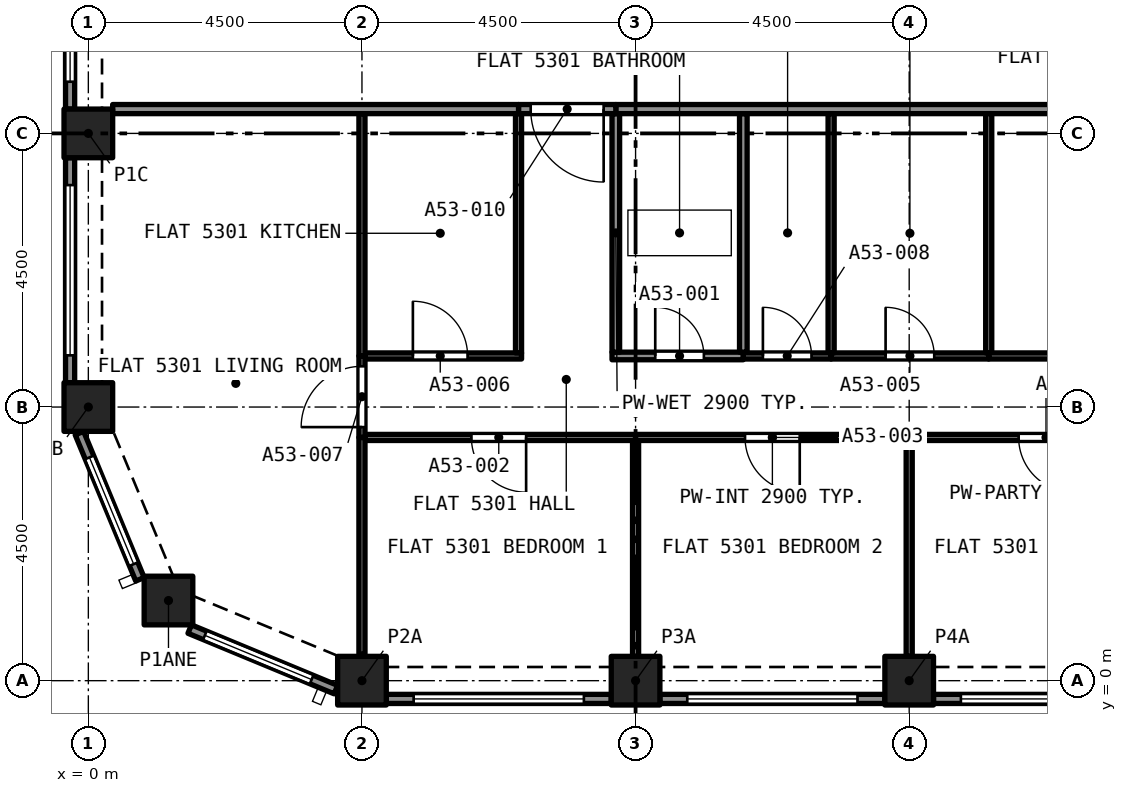
"""IFC4 building model, lengths in metres.
Left out: names, types, materials, properties, quantities, classifications, styles, units other than length and angle.
Written with IfcOpenShell. Run it as: python <this file> out.ifc"""

import sys

from ifc_helpers import new_model, si_unit, direction, frame, frame_2d, origin, origin_2d, place, context, subcontext, project, spatial, rectangle, extrude, element, fill, save


model = new_model("IFC4")
c1 = context("Model", 3, precision=1e-05, world=origin(), true_north=direction((0.0, 1.0)))
c2 = subcontext(c1, "Body", "Model", "MODEL_VIEW")
j1 = project(units=[si_unit("LENGTHUNIT", "METRE"), si_unit("PLANEANGLEUNIT", "RADIAN")], contexts=[c1])
p1 = place(None, origin())
s1 = spatial("IfcSite", under=j1, at=p1, CompositionType="ELEMENT")
p2 = place(p1, origin())
s2 = spatial("IfcBuilding", under=s1, at=p2, CompositionType="ELEMENT")
p3 = place(p2, frame((0.0, 0.0, 192.3)))
s3 = spatial("IfcBuildingStorey", under=s2, at=p3, CompositionType="ELEMENT", Elevation=192.3)
for number, where, z_axis, x_axis in (
    (1, (4.5, 0.0, 0.0), (0.0, 0.0, 1.0), (1.0, 0.0, 0.0)),
    (2, (9.0, 0.0, 0.0), (0.0, 0.0, 1.0), (1.0, 0.0, 0.0)),
    (3, (13.5, 0.0, 0.0), (0.0, 0.0, 1.0), (1.0, 0.0, 0.0)),
    (4, (1.318, 1.318, 0.0), (0.0, 0.0, 1.0), (1.0, 0.0, 0.0)),
    (5, (0.0, 4.5, 0.0), (0.0, 0.0, 1.0), (1.0, 0.0, 0.0)),
    (6, (0.0, 9.0, 0.0), (0.0, 0.0, 1.0), (1.0, 0.0, 0.0)),
):
    element("IfcColumn", number, at=place(p3, frame(where, z_axis=z_axis, x_axis=x_axis)), inside=s3, PredefinedType="COLUMN", context=c2, shape_type="SweptSolid", body=[
        extrude(rectangle(XDim=0.8, YDim=0.8, at=origin_2d()), origin(), (0.0, 0.0, 1.0), 3.2),
    ])
p4 = place(p3, frame((-0.3, 9.4, 0.0), z_axis=(0.0, 0.0, 1.0), x_axis=(0.0, 1.0, 0.0)))
e7 = element("IfcWall", 7, at=p4, inside=s3, PredefinedType="SOLIDWALL", context=c2, shape_type="SweptSolid", body=[
    extrude(rectangle(XDim=3.7, YDim=0.15, at=frame_2d((1.85, 0.0))), origin(), (0.0, 0.0, 1.0), 3.2),
])
p5 = place(p4, frame((0.45, 0.0, 0.45)))
e8 = element("IfcOpeningElement", 8, at=p5, cuts=e7, PredefinedType="OPENING", context=c2, shape_type="SweptSolid", body=[
    extrude(rectangle(XDim=2.8, YDim=1.95, at=frame_2d((1.4, 0.975))), frame((0.0, 0.085, 0.0), z_axis=(0.0, -1.0, 0.0), x_axis=(1.0, 0.0, 0.0)), (0.0, 0.0, 1.0), 0.17),
])
p6 = place(p3, frame((-0.3, 4.9, 0.0), z_axis=(0.0, 0.0, 1.0), x_axis=(0.0, 1.0, 0.0)))
e9 = element("IfcWall", 9, at=p6, inside=s3, PredefinedType="SOLIDWALL", context=c2, shape_type="SweptSolid", body=[
    extrude(rectangle(XDim=3.7, YDim=0.15, at=frame_2d((1.85, 0.0))), origin(), (0.0, 0.0, 1.0), 3.2),
])
p7 = place(p6, frame((0.45, 0.0, 0.45)))
e10 = element("IfcOpeningElement", 10, at=p7, cuts=e9, PredefinedType="OPENING", context=c2, shape_type="SweptSolid", body=[
    extrude(rectangle(XDim=2.8, YDim=1.95, at=frame_2d((1.4, 0.975))), frame((0.0, 0.085, 0.0), z_axis=(0.0, -1.0, 0.0), x_axis=(1.0, 0.0, 0.0)), (0.0, 0.0, 1.0), 0.17),
])
p8 = place(p3, frame((0.849, 1.667, 0.0), z_axis=(0.0, 0.0, 1.0), x_axis=(-0.382669406082, 0.923885342263, 0.0)))
e11 = element("IfcWall", 11, at=p8, inside=s3, PredefinedType="SOLIDWALL", context=c2, shape_type="SweptSolid", body=[
    extrude(rectangle(XDim=2.602, YDim=0.15, at=frame_2d((1.301, 0.0))), origin(), (0.0, 0.0, 1.0), 3.2),
])
p9 = place(p8, frame((0.27, 0.0, 0.45)))
e12 = element("IfcOpeningElement", 12, at=p9, cuts=e11, PredefinedType="OPENING", context=c2, shape_type="SweptSolid", body=[
    extrude(rectangle(XDim=1.9, YDim=1.95, at=frame_2d((0.95, 0.975))), frame((0.0, 0.085, 0.0), z_axis=(0.0, -1.0, 0.0), x_axis=(1.0, 0.0, 0.0)), (0.0, 0.0, 1.0), 0.17),
])
p10 = place(p3, frame((4.071, -0.147, 0.0), z_axis=(0.0, 0.0, 1.0), x_axis=(-0.923885342263, 0.382669406082, 0.0)))
e13 = element("IfcWall", 13, at=p10, inside=s3, PredefinedType="SOLIDWALL", context=c2, shape_type="SweptSolid", body=[
    extrude(rectangle(XDim=2.602, YDim=0.15, at=frame_2d((1.301, 0.0))), origin(), (0.0, 0.0, 1.0), 3.2),
])
p11 = place(p10, frame((0.432, 0.0, 0.45)))
e14 = element("IfcOpeningElement", 14, at=p11, cuts=e13, PredefinedType="OPENING", context=c2, shape_type="SweptSolid", body=[
    extrude(rectangle(XDim=1.9, YDim=1.95, at=frame_2d((0.95, 0.975))), frame((0.0, 0.085, 0.0), z_axis=(0.0, -1.0, 0.0), x_axis=(1.0, 0.0, 0.0)), (0.0, 0.0, 1.0), 0.17),
])
p12 = place(p3, frame((8.6, -0.3, 0.0), z_axis=(0.0, 0.0, 1.0), x_axis=(-1.0, 0.0, 0.0)))
e15 = element("IfcWall", 15, at=p12, inside=s3, PredefinedType="SOLIDWALL", context=c2, shape_type="SweptSolid", body=[
    extrude(rectangle(XDim=3.7, YDim=0.15, at=frame_2d((1.85, 0.0))), origin(), (0.0, 0.0, 1.0), 3.2),
])
p13 = place(p12, frame((0.45, 0.0, 0.45)))
e16 = element("IfcOpeningElement", 16, at=p13, cuts=e15, PredefinedType="OPENING", context=c2, shape_type="SweptSolid", body=[
    extrude(rectangle(XDim=2.8, YDim=1.95, at=frame_2d((1.4, 0.975))), frame((0.0, 0.085, 0.0), z_axis=(0.0, -1.0, 0.0), x_axis=(1.0, 0.0, 0.0)), (0.0, 0.0, 1.0), 0.17),
])
p14 = place(p3, frame((13.1, -0.3, 0.0), z_axis=(0.0, 0.0, 1.0), x_axis=(-1.0, 0.0, 0.0)))
e17 = element("IfcWall", 17, at=p14, inside=s3, PredefinedType="SOLIDWALL", context=c2, shape_type="SweptSolid", body=[
    extrude(rectangle(XDim=3.7, YDim=0.15, at=frame_2d((1.85, 0.0))), origin(), (0.0, 0.0, 1.0), 3.2),
])
p15 = place(p14, frame((0.45, 0.0, 0.45)))
e18 = element("IfcOpeningElement", 18, at=p15, cuts=e17, PredefinedType="OPENING", context=c2, shape_type="SweptSolid", body=[
    extrude(rectangle(XDim=2.8, YDim=1.95, at=frame_2d((1.4, 0.975))), frame((0.0, 0.085, 0.0), z_axis=(0.0, -1.0, 0.0), x_axis=(1.0, 0.0, 0.0)), (0.0, 0.0, 1.0), 0.17),
])
p16 = place(p3, frame((17.6, -0.3, 0.0), z_axis=(0.0, 0.0, 1.0), x_axis=(-1.0, 0.0, 0.0)))
e19 = element("IfcWall", 19, at=p16, inside=s3, PredefinedType="SOLIDWALL", context=c2, shape_type="SweptSolid", body=[
    extrude(rectangle(XDim=3.7, YDim=0.15, at=frame_2d((1.85, 0.0))), origin(), (0.0, 0.0, 1.0), 3.2),
])
p17 = place(p16, frame((0.45, 0.0, 0.45)))
e20 = element("IfcOpeningElement", 20, at=p17, cuts=e19, PredefinedType="OPENING", context=c2, shape_type="SweptSolid", body=[
    extrude(rectangle(XDim=2.8, YDim=1.95, at=frame_2d((1.4, 0.975))), frame((0.0, 0.085, 0.0), z_axis=(0.0, -1.0, 0.0), x_axis=(1.0, 0.0, 0.0)), (0.0, 0.0, 1.0), 0.17),
])
p18 = place(p3, frame((8.613, 5.34, 0.0), z_axis=(0.0, 0.0, 1.0), x_axis=(1.0, 0.0, 0.0)))
e21 = element("IfcWall", 21, at=p18, inside=s3, PredefinedType="PARTITIONING", context=c2, shape_type="SweptSolid", body=[
    extrude(rectangle(XDim=2.159, YDim=0.125, at=frame_2d((1.08, 0.0))), origin(), (0.0, 0.0, 1.0), 2.9),
])
p19 = place(p18, frame((0.711, 0.0, 0.0)))
e22 = element("IfcOpeningElement", 22, at=p19, cuts=e21, PredefinedType="OPENING", context=c2, shape_type="SweptSolid", body=[
    extrude(rectangle(XDim=0.8, YDim=2.1, at=frame_2d((0.4, 1.05))), frame((0.0, 0.073, 0.0), z_axis=(0.0, -1.0, 0.0), x_axis=(1.0, 0.0, 0.0)), (0.0, 0.0, 1.0), 0.145),
])
for number, where, z_axis, x_axis in (
    (23, (8.675, 5.403, 0.0), (0.0, 0.0, 1.0), (0.0, 1.0, 0.0)),
    (24, (10.772, 5.403, 0.0), (0.0, 0.0, 1.0), (0.0, 1.0, 0.0)),
):
    element("IfcWall", number, at=place(p3, frame(where, z_axis=z_axis, x_axis=x_axis)), inside=s3, PredefinedType="PARTITIONING", context=c2, shape_type="SweptSolid", body=[
        extrude(rectangle(XDim=3.922, YDim=0.125, at=frame_2d((1.961, 0.0))), origin(), (0.0, 0.0, 1.0), 2.9),
    ])
p20 = place(p3, frame((8.675, 9.4, 0.0), z_axis=(0.0, 0.0, 1.0), x_axis=(1.0, 0.0, 0.0)))
e25 = element("IfcWall", 25, at=p20, inside=s3, PredefinedType="PARTITIONING", context=c2, shape_type="SweptSolid", body=[
    extrude(rectangle(XDim=8.925, YDim=0.15, at=frame_2d((4.462, 0.0))), origin(), (0.0, 0.0, 1.0), 2.9),
])
p21 = place(p3, frame((9.0, 0.4, 0.0), z_axis=(0.0, 0.0, 1.0), x_axis=(0.0, 1.0, 0.0)))
e26 = element("IfcWall", 26, at=p21, inside=s3, PredefinedType="PARTITIONING", context=c2, shape_type="SweptSolid", body=[
    extrude(rectangle(XDim=3.55, YDim=0.1, at=frame_2d((1.775, 0.0))), origin(), (0.0, 0.0, 1.0), 2.9),
])
p22 = place(p3, frame((9.0, 4.0, 0.0), z_axis=(0.0, 0.0, 1.0), x_axis=(-1.0, 0.0, 0.0)))
e27 = element("IfcWall", 27, at=p22, inside=s3, PredefinedType="PARTITIONING", context=c2, shape_type="SweptSolid", body=[
    extrude(rectangle(XDim=4.45, YDim=0.1, at=frame_2d((2.225, 0.0))), origin(), (0.0, 0.0, 1.0), 2.9),
])
p23 = place(p22, frame((1.8, 0.0, 0.0)))
e28 = element("IfcOpeningElement", 28, at=p23, cuts=e27, PredefinedType="OPENING", context=c2, shape_type="SweptSolid", body=[
    extrude(rectangle(XDim=0.9, YDim=2.1, at=frame_2d((0.45, 1.05))), frame((0.0, 0.06, 0.0), z_axis=(0.0, -1.0, 0.0), x_axis=(1.0, 0.0, 0.0)), (0.0, 0.0, 1.0), 0.12),
])
p24 = place(p3, frame((4.5, 0.433, 0.0), z_axis=(0.0, 0.0, 1.0), x_axis=(0.0, 1.0, 0.0)))
e29 = element("IfcWall", 29, at=p24, inside=s3, PredefinedType="PARTITIONING", context=c2, shape_type="SweptSolid", body=[
    extrude(rectangle(XDim=3.567, YDim=0.1, at=frame_2d((1.784, 0.0))), origin(), (0.0, 0.0, 1.0), 2.9),
])
p25 = place(p3, frame((13.5, 0.4, 0.0), z_axis=(0.0, 0.0, 1.0), x_axis=(0.0, 1.0, 0.0)))
e30 = element("IfcWall", 30, at=p25, inside=s3, PredefinedType="PARTITIONING", context=c2, shape_type="SweptSolid", body=[
    extrude(rectangle(XDim=3.55, YDim=0.1, at=frame_2d((1.775, 0.0))), origin(), (0.0, 0.0, 1.0), 2.9),
])
p26 = place(p3, frame((13.5, 4.0, 0.0), z_axis=(0.0, 0.0, 1.0), x_axis=(-1.0, 0.0, 0.0)))
e31 = element("IfcWall", 31, at=p26, inside=s3, PredefinedType="PARTITIONING", context=c2, shape_type="SweptSolid", body=[
    extrude(rectangle(XDim=4.5, YDim=0.1, at=frame_2d((2.25, 0.0))), origin(), (0.0, 0.0, 1.0), 2.9),
])
p27 = place(p26, frame((1.8, 0.0, 0.0)))
e32 = element("IfcOpeningElement", 32, at=p27, cuts=e31, PredefinedType="OPENING", context=c2, shape_type="SweptSolid", body=[
    extrude(rectangle(XDim=0.9, YDim=2.1, at=frame_2d((0.45, 1.05))), frame((0.0, 0.06, 0.0), z_axis=(0.0, -1.0, 0.0), x_axis=(1.0, 0.0, 0.0)), (0.0, 0.0, 1.0), 0.12),
])
p28 = place(p3, frame((17.9, 4.0, 0.0), z_axis=(0.0, 0.0, 1.0), x_axis=(-1.0, 0.0, 0.0)))
e33 = element("IfcWall", 33, at=p28, inside=s3, PredefinedType="PARTITIONING", context=c2, shape_type="SweptSolid", body=[
    extrude(rectangle(XDim=4.4, YDim=0.1, at=frame_2d((2.2, 0.0))), origin(), (0.0, 0.0, 1.0), 2.9),
])
p29 = place(p28, frame((1.7, 0.0, 0.0)))
e34 = element("IfcOpeningElement", 34, at=p29, cuts=e33, PredefinedType="OPENING", context=c2, shape_type="SweptSolid", body=[
    extrude(rectangle(XDim=0.9, YDim=2.1, at=frame_2d((0.45, 1.05))), frame((0.0, 0.06, 0.0), z_axis=(0.0, -1.0, 0.0), x_axis=(1.0, 0.0, 0.0)), (0.0, 0.0, 1.0), 0.12),
])
p30 = place(p3, frame((12.216, 5.34, 0.0), z_axis=(0.0, 0.0, 1.0), x_axis=(1.0, 0.0, 0.0)))
e35 = element("IfcWall", 35, at=p30, inside=s3, PredefinedType="PARTITIONING", context=c2, shape_type="SweptSolid", body=[
    extrude(rectangle(XDim=2.591, YDim=0.1, at=frame_2d((1.296, 0.0))), origin(), (0.0, 0.0, 1.0), 2.9),
])
p31 = place(p30, frame((0.896, 0.0, 0.0)))
e36 = element("IfcOpeningElement", 36, at=p31, cuts=e35, PredefinedType="OPENING", context=c2, shape_type="SweptSolid", body=[
    extrude(rectangle(XDim=0.8, YDim=2.1, at=frame_2d((0.4, 1.05))), frame((0.0, 0.06, 0.0), z_axis=(0.0, -1.0, 0.0), x_axis=(1.0, 0.0, 0.0)), (0.0, 0.0, 1.0), 0.12),
])
for number, where, z_axis, x_axis in (
    (37, (12.216, 5.39, 0.0), (0.0, 0.0, 1.0), (0.0, 1.0, 0.0)),
    (38, (14.808, 5.39, 0.0), (0.0, 0.0, 1.0), (0.0, 1.0, 0.0)),
):
    element("IfcWall", number, at=place(p3, frame(where, z_axis=z_axis, x_axis=x_axis)), inside=s3, PredefinedType="PARTITIONING", context=c2, shape_type="SweptSolid", body=[
        extrude(rectangle(XDim=3.935, YDim=0.1, at=frame_2d((1.968, 0.0))), origin(), (0.0, 0.0, 1.0), 2.9),
    ])
p32 = place(p3, frame((4.55, 5.34, 0.0), z_axis=(0.0, 0.0, 1.0), x_axis=(1.0, 0.0, 0.0)))
e39 = element("IfcWall", 39, at=p32, inside=s3, PredefinedType="PARTITIONING", context=c2, shape_type="SweptSolid", body=[
    extrude(rectangle(XDim=2.575, YDim=0.1, at=frame_2d((1.288, 0.0))), origin(), (0.0, 0.0, 1.0), 2.9),
])
p33 = place(p32, frame((0.788, 0.0, 0.0)))
e40 = element("IfcOpeningElement", 40, at=p33, cuts=e39, PredefinedType="OPENING", context=c2, shape_type="SweptSolid", body=[
    extrude(rectangle(XDim=0.9, YDim=2.1, at=frame_2d((0.45, 1.05))), frame((0.0, 0.06, 0.0), z_axis=(0.0, -1.0, 0.0), x_axis=(1.0, 0.0, 0.0)), (0.0, 0.0, 1.0), 0.12),
])
p34 = place(p3, frame((7.075, 5.39, 0.0), z_axis=(0.0, 0.0, 1.0), x_axis=(0.0, 1.0, 0.0)))
e41 = element("IfcWall", 41, at=p34, inside=s3, PredefinedType="PARTITIONING", context=c2, shape_type="SweptSolid", body=[
    extrude(rectangle(XDim=3.935, YDim=0.1, at=frame_2d((1.968, 0.0))), origin(), (0.0, 0.0, 1.0), 2.9),
])
p35 = place(p3, frame((4.5, 4.0, 0.0), z_axis=(0.0, 0.0, 1.0), x_axis=(0.0, 1.0, 0.0)))
e42 = element("IfcWall", 42, at=p35, inside=s3, PredefinedType="PARTITIONING", context=c2, shape_type="SweptSolid", body=[
    extrude(rectangle(XDim=1.34, YDim=0.1, at=frame_2d((0.67, 0.0))), origin(), (0.0, 0.0, 1.0), 2.9),
])
p36 = place(p35, frame((0.17, 0.0, 0.0)))
e43 = element("IfcOpeningElement", 43, at=p36, cuts=e42, PredefinedType="OPENING", context=c2, shape_type="SweptSolid", body=[
    extrude(rectangle(XDim=1.0, YDim=2.1, at=frame_2d((0.5, 1.05))), frame((0.0, 0.06, 0.0), z_axis=(0.0, -1.0, 0.0), x_axis=(1.0, 0.0, 0.0)), (0.0, 0.0, 1.0), 0.12),
])
p37 = place(p3, frame((10.772, 5.34, 0.0), z_axis=(0.0, 0.0, 1.0), x_axis=(1.0, 0.0, 0.0)))
e44 = element("IfcWall", 44, at=p37, inside=s3, PredefinedType="PARTITIONING", context=c2, shape_type="SweptSolid", body=[
    extrude(rectangle(XDim=1.445, YDim=0.1, at=frame_2d((0.722, 0.0))), origin(), (0.0, 0.0, 1.0), 2.9),
])
p38 = place(p37, frame((0.322, 0.0, 0.0)))
e45 = element("IfcOpeningElement", 45, at=p38, cuts=e44, PredefinedType="OPENING", context=c2, shape_type="SweptSolid", body=[
    extrude(rectangle(XDim=0.8, YDim=2.1, at=frame_2d((0.4, 1.05))), frame((0.0, 0.06, 0.0), z_axis=(0.0, -1.0, 0.0), x_axis=(1.0, 0.0, 0.0)), (0.0, 0.0, 1.0), 0.12),
])
p39 = place(p3, frame((14.808, 5.34, 0.0), z_axis=(0.0, 0.0, 1.0), x_axis=(1.0, 0.0, 0.0)))
e46 = element("IfcWall", 46, at=p39, inside=s3, PredefinedType="PARTITIONING", context=c2, shape_type="SweptSolid", body=[
    extrude(rectangle(XDim=3.092, YDim=0.1, at=frame_2d((1.546, 0.0))), origin(), (0.0, 0.0, 1.0), 2.9),
])
p40 = place(p39, frame((1.146, 0.0, 0.0)))
e47 = element("IfcOpeningElement", 47, at=p40, cuts=e46, PredefinedType="OPENING", context=c2, shape_type="SweptSolid", body=[
    extrude(rectangle(XDim=0.9, YDim=2.1, at=frame_2d((0.45, 1.05))), frame((0.0, 0.06, 0.0), z_axis=(0.0, -1.0, 0.0), x_axis=(1.0, 0.0, 0.0)), (0.0, 0.0, 1.0), 0.12),
])
p41 = place(p3, frame((8.675, 9.4, 0.0), z_axis=(0.0, 0.0, 1.0), x_axis=(-1.0, 0.0, 0.0)))
e48 = element("IfcWall", 48, at=p41, inside=s3, PredefinedType="PARTITIONING", context=c2, shape_type="SweptSolid", body=[
    extrude(rectangle(XDim=1.6, YDim=0.15, at=frame_2d((0.8, 0.0))), origin(), (0.0, 0.0, 1.0), 2.9),
])
p42 = place(p41, frame((0.2, 0.0, 0.0)))
e49 = element("IfcOpeningElement", 49, at=p42, cuts=e48, PredefinedType="OPENING", context=c2, shape_type="SweptSolid", body=[
    extrude(rectangle(XDim=1.2, YDim=2.4, at=frame_2d((0.6, 1.2))), frame((0.0, 0.085, 0.0), z_axis=(0.0, -1.0, 0.0), x_axis=(1.0, 0.0, 0.0)), (0.0, 0.0, 1.0), 0.17),
])
p43 = place(p3, frame((4.5, 5.34, 0.0), z_axis=(0.0, 0.0, 1.0), x_axis=(0.0, 1.0, 0.0)))
e50 = element("IfcWall", 50, at=p43, inside=s3, PredefinedType="PARTITIONING", context=c2, shape_type="SweptSolid", body=[
    extrude(rectangle(XDim=3.985, YDim=0.1, at=frame_2d((1.992, 0.0))), origin(), (0.0, 0.0, 1.0), 2.9),
])
p44 = place(p3, frame((0.4, 9.4, 0.0), z_axis=(0.0, 0.0, 1.0), x_axis=(1.0, 0.0, 0.0)))
e51 = element("IfcWall", 51, at=p44, inside=s3, PredefinedType="PARTITIONING", context=c2, shape_type="SweptSolid", body=[
    extrude(rectangle(XDim=6.675, YDim=0.15, at=frame_2d((3.337, 0.0))), origin(), (0.0, 0.0, 1.0), 2.9),
])
p45 = place(p5, origin())
e52 = element("IfcWindow", 52, at=p45, inside=s3, PartitioningType="SINGLE_PANEL", PredefinedType="WINDOW", context=c2, shape_type="SweptSolid", body=[
    extrude(rectangle(XDim=2.8, YDim=1.95, at=frame_2d((1.4, 0.975))), frame((0.0, 0.03, 0.0), z_axis=(0.0, -1.0, 0.0), x_axis=(1.0, 0.0, 0.0)), (0.0, 0.0, 1.0), 0.06),
])
fill(e8, e52)
p46 = place(p7, origin())
e53 = element("IfcWindow", 53, at=p46, inside=s3, PartitioningType="SINGLE_PANEL", PredefinedType="WINDOW", context=c2, shape_type="SweptSolid", body=[
    extrude(rectangle(XDim=2.8, YDim=1.95, at=frame_2d((1.4, 0.975))), frame((0.0, 0.03, 0.0), z_axis=(0.0, -1.0, 0.0), x_axis=(1.0, 0.0, 0.0)), (0.0, 0.0, 1.0), 0.06),
])
fill(e10, e53)
p47 = place(p9, origin())
e54 = element("IfcWindow", 54, at=p47, inside=s3, PartitioningType="SINGLE_PANEL", PredefinedType="WINDOW", context=c2, shape_type="SweptSolid", body=[
    extrude(rectangle(XDim=1.9, YDim=1.95, at=frame_2d((0.95, 0.975))), frame((0.0, 0.03, 0.0), z_axis=(0.0, -1.0, 0.0), x_axis=(1.0, 0.0, 0.0)), (0.0, 0.0, 1.0), 0.06),
])
fill(e12, e54)
p48 = place(p11, origin())
e55 = element("IfcWindow", 55, at=p48, inside=s3, PartitioningType="SINGLE_PANEL", PredefinedType="WINDOW", context=c2, shape_type="SweptSolid", body=[
    extrude(rectangle(XDim=1.9, YDim=1.95, at=frame_2d((0.95, 0.975))), frame((0.0, 0.03, 0.0), z_axis=(0.0, -1.0, 0.0), x_axis=(1.0, 0.0, 0.0)), (0.0, 0.0, 1.0), 0.06),
])
fill(e14, e55)
p49 = place(p13, origin())
e56 = element("IfcWindow", 56, at=p49, inside=s3, PartitioningType="SINGLE_PANEL", PredefinedType="WINDOW", context=c2, shape_type="SweptSolid", body=[
    extrude(rectangle(XDim=2.8, YDim=1.95, at=frame_2d((1.4, 0.975))), frame((0.0, 0.03, 0.0), z_axis=(0.0, -1.0, 0.0), x_axis=(1.0, 0.0, 0.0)), (0.0, 0.0, 1.0), 0.06),
])
fill(e16, e56)
p50 = place(p15, origin())
e57 = element("IfcWindow", 57, at=p50, inside=s3, PartitioningType="SINGLE_PANEL", PredefinedType="WINDOW", context=c2, shape_type="SweptSolid", body=[
    extrude(rectangle(XDim=2.8, YDim=1.95, at=frame_2d((1.4, 0.975))), frame((0.0, 0.03, 0.0), z_axis=(0.0, -1.0, 0.0), x_axis=(1.0, 0.0, 0.0)), (0.0, 0.0, 1.0), 0.06),
])
fill(e18, e57)
p51 = place(p17, origin())
e58 = element("IfcWindow", 58, at=p51, inside=s3, PartitioningType="SINGLE_PANEL", PredefinedType="WINDOW", context=c2, shape_type="SweptSolid", body=[
    extrude(rectangle(XDim=2.8, YDim=1.95, at=frame_2d((1.4, 0.975))), frame((0.0, 0.03, 0.0), z_axis=(0.0, -1.0, 0.0), x_axis=(1.0, 0.0, 0.0)), (0.0, 0.0, 1.0), 0.06),
])
fill(e20, e58)
p52 = place(p19, origin())
e59 = element("IfcDoor", 59, at=p52, inside=s3, OperationType="SINGLE_SWING_RIGHT", PredefinedType="DOOR", context=c2, shape_type="SweptSolid", body=[
    extrude(rectangle(XDim=0.8, YDim=2.1, at=frame_2d((0.4, 1.05))), frame((0.0, 0.025, 0.0), z_axis=(0.0, -1.0, 0.0), x_axis=(1.0, 0.0, 0.0)), (0.0, 0.0, 1.0), 0.05),
])
fill(e22, e59)
p53 = place(p23, origin())
e60 = element("IfcDoor", 60, at=p53, inside=s3, OperationType="SINGLE_SWING_RIGHT", PredefinedType="DOOR", context=c2, shape_type="SweptSolid", body=[
    extrude(rectangle(XDim=0.9, YDim=2.1, at=frame_2d((0.45, 1.05))), frame((0.0, 0.025, 0.0), z_axis=(0.0, -1.0, 0.0), x_axis=(1.0, 0.0, 0.0)), (0.0, 0.0, 1.0), 0.05),
])
fill(e28, e60)
p54 = place(p27, origin())
e61 = element("IfcDoor", 61, at=p54, inside=s3, OperationType="SINGLE_SWING_LEFT", PredefinedType="DOOR", context=c2, shape_type="SweptSolid", body=[
    extrude(rectangle(XDim=0.9, YDim=2.1, at=frame_2d((0.45, 1.05))), frame((0.0, 0.025, 0.0), z_axis=(0.0, -1.0, 0.0), x_axis=(1.0, 0.0, 0.0)), (0.0, 0.0, 1.0), 0.05),
])
fill(e32, e61)
p55 = place(p29, origin())
e62 = element("IfcDoor", 62, at=p55, inside=s3, OperationType="SINGLE_SWING_LEFT", PredefinedType="DOOR", context=c2, shape_type="SweptSolid", body=[
    extrude(rectangle(XDim=0.9, YDim=2.1, at=frame_2d((0.45, 1.05))), frame((0.0, 0.025, 0.0), z_axis=(0.0, -1.0, 0.0), x_axis=(1.0, 0.0, 0.0)), (0.0, 0.0, 1.0), 0.05),
])
fill(e34, e62)
p56 = place(p31, origin())
e63 = element("IfcDoor", 63, at=p56, inside=s3, OperationType="SINGLE_SWING_LEFT", PredefinedType="DOOR", context=c2, shape_type="SweptSolid", body=[
    extrude(rectangle(XDim=0.8, YDim=2.1, at=frame_2d((0.4, 1.05))), frame((0.0, 0.025, 0.0), z_axis=(0.0, -1.0, 0.0), x_axis=(1.0, 0.0, 0.0)), (0.0, 0.0, 1.0), 0.05),
])
fill(e36, e63)
p57 = place(p33, origin())
e64 = element("IfcDoor", 64, at=p57, inside=s3, OperationType="SINGLE_SWING_LEFT", PredefinedType="DOOR", context=c2, shape_type="SweptSolid", body=[
    extrude(rectangle(XDim=0.9, YDim=2.1, at=frame_2d((0.45, 1.05))), frame((0.0, 0.025, 0.0), z_axis=(0.0, -1.0, 0.0), x_axis=(1.0, 0.0, 0.0)), (0.0, 0.0, 1.0), 0.05),
])
fill(e40, e64)
p58 = place(p36, origin())
e65 = element("IfcDoor", 65, at=p58, inside=s3, OperationType="SINGLE_SWING_RIGHT", PredefinedType="DOOR", context=c2, shape_type="SweptSolid", body=[
    extrude(rectangle(XDim=1.0, YDim=2.1, at=frame_2d((0.5, 1.05))), frame((0.0, 0.025, 0.0), z_axis=(0.0, -1.0, 0.0), x_axis=(1.0, 0.0, 0.0)), (0.0, 0.0, 1.0), 0.05),
])
fill(e43, e65)
p59 = place(p38, origin())
e66 = element("IfcDoor", 66, at=p59, inside=s3, OperationType="SINGLE_SWING_RIGHT", PredefinedType="DOOR", context=c2, shape_type="SweptSolid", body=[
    extrude(rectangle(XDim=0.8, YDim=2.1, at=frame_2d((0.4, 1.05))), frame((0.0, 0.025, 0.0), z_axis=(0.0, -1.0, 0.0), x_axis=(1.0, 0.0, 0.0)), (0.0, 0.0, 1.0), 0.05),
])
fill(e45, e66)
p60 = place(p42, origin())
e67 = element("IfcDoor", 67, at=p60, inside=s3, OperationType="SINGLE_SWING_RIGHT", PredefinedType="DOOR", context=c2, shape_type="SweptSolid", body=[
    extrude(rectangle(XDim=1.2, YDim=2.4, at=frame_2d((0.6, 1.2))), frame((0.0, 0.025, 0.0), z_axis=(0.0, -1.0, 0.0), x_axis=(1.0, 0.0, 0.0)), (0.0, 0.0, 1.0), 0.05),
])
fill(e49, e67)
save(model, sys.argv[1])
